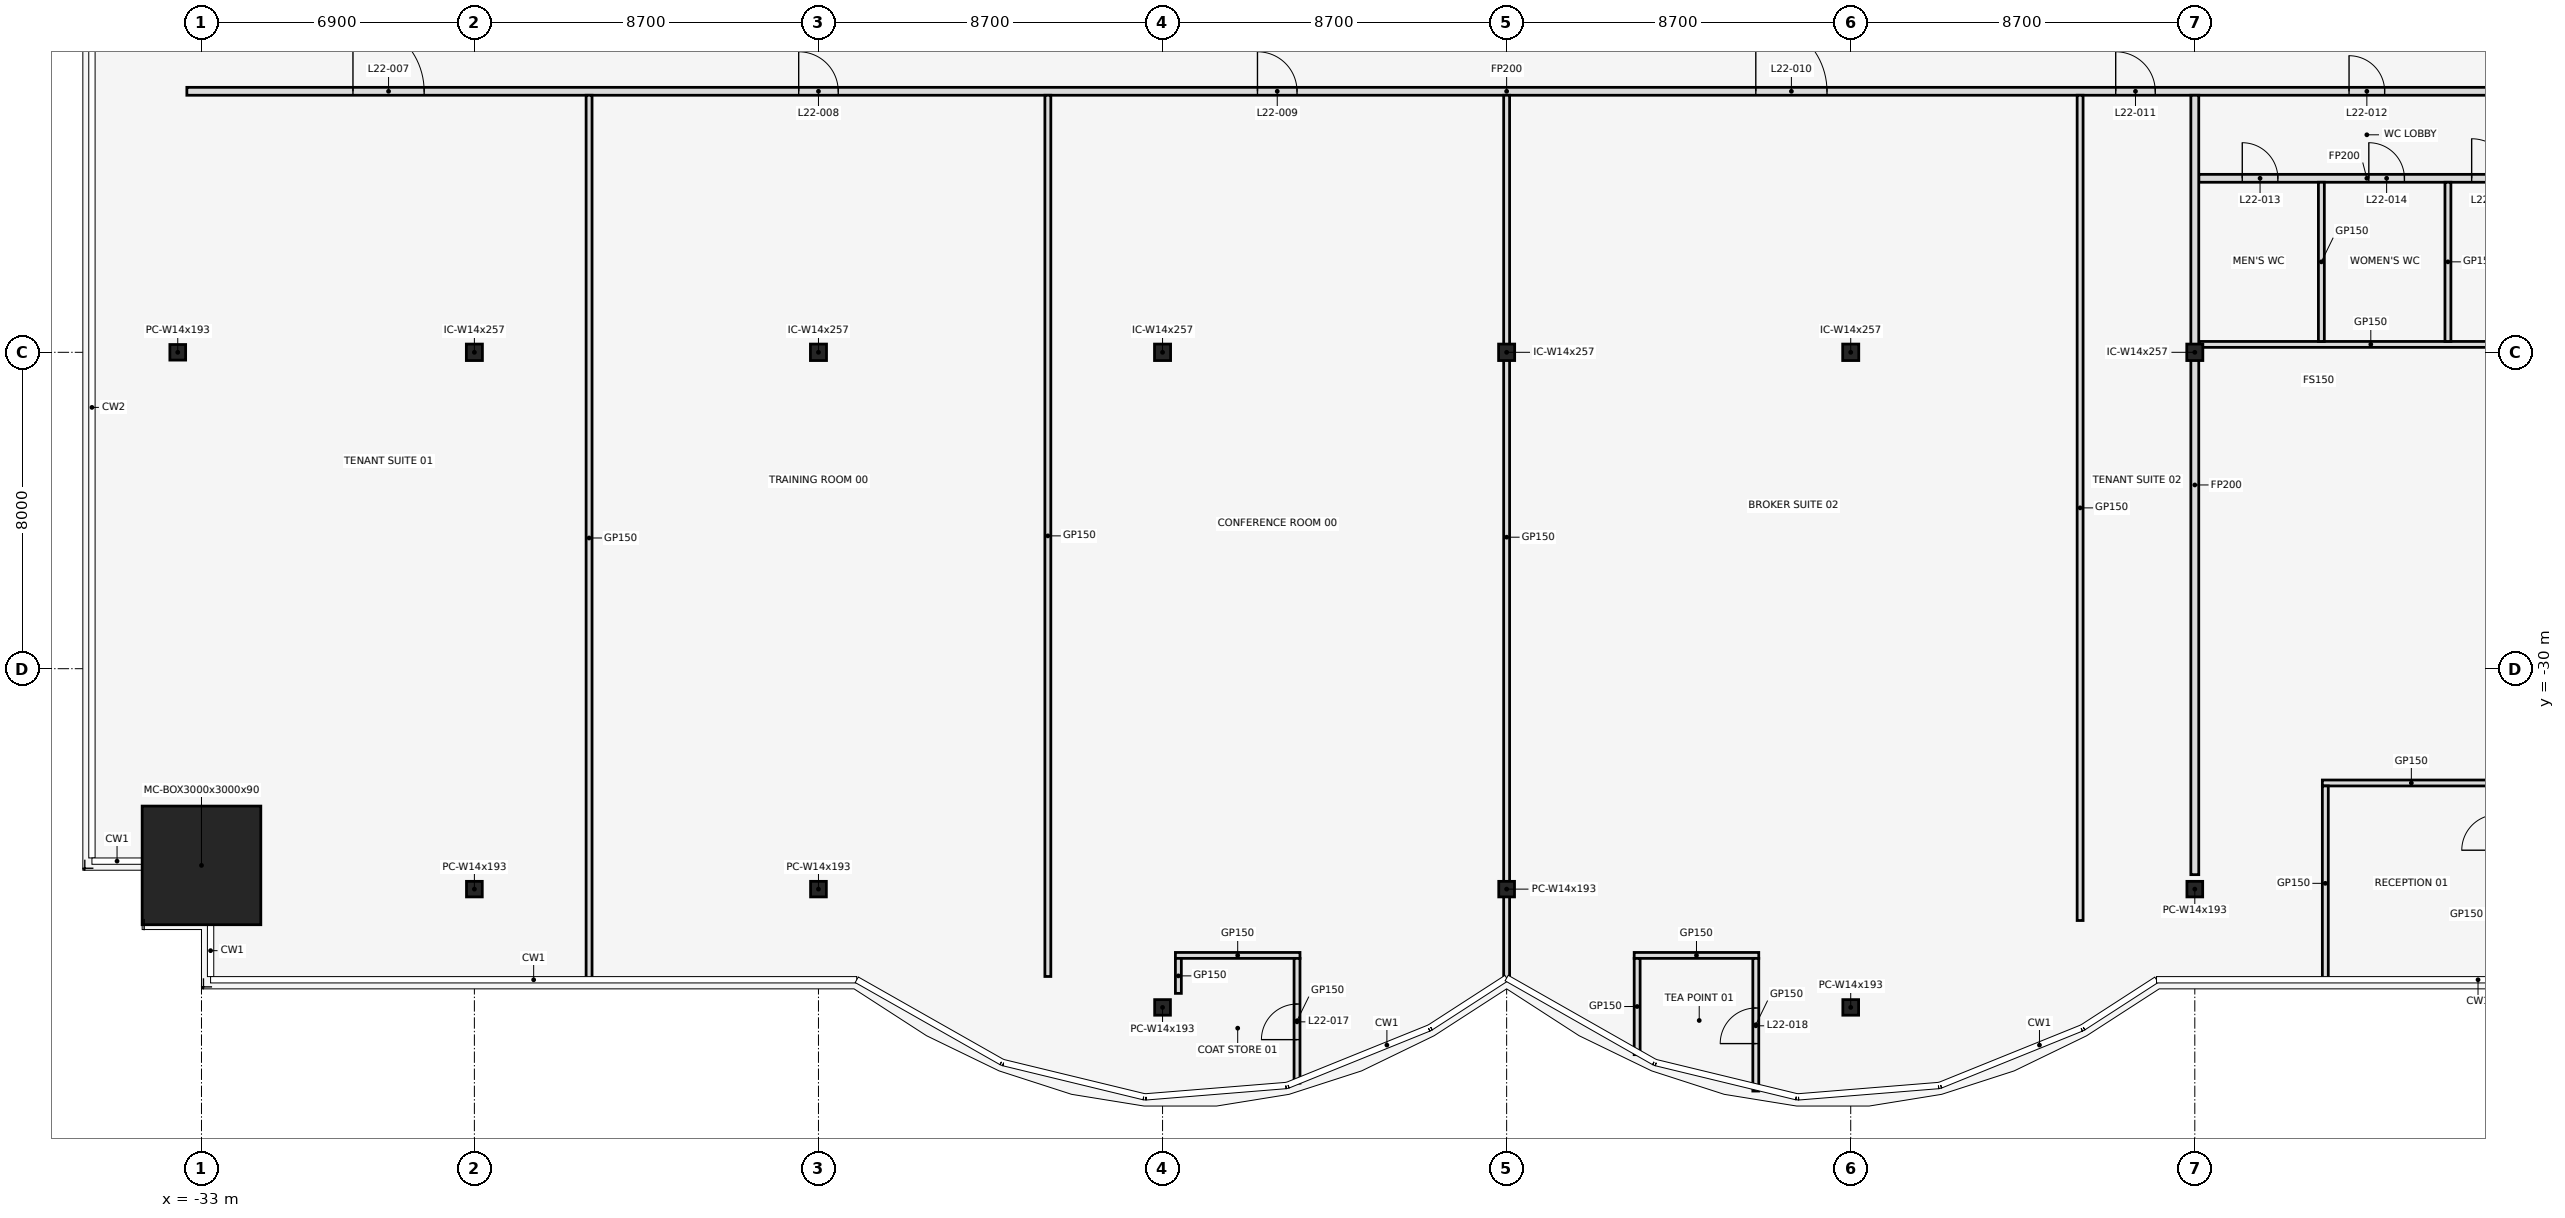
"""IFC4 building model, lengths in metres.
Left out: names, types, materials, properties, quantities, classifications, styles, units other than length and angle.
Written with IfcOpenShell. Run it as: python <this file> out.ifc"""

import sys

from ifc_helpers import new_model, si_unit, direction, frame, frame_2d, origin, origin_2d, place, context, subcontext, project, spatial, rectangle, hollow_rectangle, i_section, extrude, element, fill, save


model = new_model("IFC4")
c1 = context("Model", 3, precision=1e-05, world=origin(), true_north=direction((0.0, 1.0)))
c2 = subcontext(c1, "Body", "Model", "MODEL_VIEW")
j1 = project(units=[si_unit("LENGTHUNIT", "METRE"), si_unit("PLANEANGLEUNIT", "RADIAN")], contexts=[c1])
p1 = place(None, origin())
s1 = spatial("IfcSite", under=j1, at=p1, CompositionType="ELEMENT")
p2 = place(p1, origin())
s2 = spatial("IfcBuilding", under=s1, at=p2, CompositionType="ELEMENT")
p3 = place(p2, frame((0.0, 0.0, 106.3)))
s3 = spatial("IfcBuildingStorey", under=s2, at=p3, CompositionType="ELEMENT", Elevation=106.3)
p4 = place(p3, frame((-33.0, -34.974, 0.0), z_axis=(0.0, 0.0, 1.0), x_axis=(1.0, 0.0, 0.0)))
e1 = element("IfcColumn", 1, at=p4, inside=s3, PredefinedType="COLUMN", context=c2, shape_type="SweptSolid", body=[
    extrude(hollow_rectangle(XDim=3.0, YDim=3.0, WallThickness=0.09, at=origin_2d()), origin(), (0.0, 0.0, 1.0), 4.1),
])
for number, where, z_axis, x_axis in (
    (2, (-26.1, -35.574, 0.0), (0.0, 0.0, 1.0), (1.0, 0.0, 0.0)),
    (3, (-17.4, -35.574, 0.0), (0.0, 0.0, 1.0), (1.0, 0.0, 0.0)),
    (4, (-8.7, -38.565, 0.0), (0.0, 0.0, 1.0), (1.0, 0.0, 0.0)),
    (5, (0.0, -35.574, 0.0), (0.0, 0.0, 1.0), (1.0, 0.0, 0.0)),
    (6, (8.7, -38.565, 0.0), (0.0, 0.0, 1.0), (1.0, 0.0, 0.0)),
    (7, (17.4, -35.574, 0.0), (0.0, 0.0, 1.0), (1.0, 0.0, 0.0)),
    (8, (-33.6, -22.0, 0.0), (0.0, 0.0, 1.0), (1.0, 0.0, 0.0)),
):
    element("IfcColumn", number, at=place(p3, frame(where, z_axis=z_axis, x_axis=x_axis)), inside=s3, PredefinedType="COLUMN", context=c2, shape_type="SweptSolid", body=[
        extrude(i_section(OverallWidth=0.399, OverallDepth=0.394, WebThickness=0.023, FlangeThickness=0.037, at=origin_2d()), origin(), (0.0, 0.0, 1.0), 4.1),
    ])
for number, where, z_axis, x_axis in (
    (9, (-26.1, -22.0, 0.0), (0.0, 0.0, 1.0), (1.0, 0.0, 0.0)),
    (10, (-17.4, -22.0, 0.0), (0.0, 0.0, 1.0), (1.0, 0.0, 0.0)),
    (11, (-8.7, -22.0, 0.0), (0.0, 0.0, 1.0), (1.0, 0.0, 0.0)),
    (12, (0.0, -22.0, 0.0), (0.0, 0.0, 1.0), (1.0, 0.0, 0.0)),
    (13, (8.7, -22.0, 0.0), (0.0, 0.0, 1.0), (1.0, 0.0, 0.0)),
    (14, (17.4, -22.0, 0.0), (0.0, 0.0, 1.0), (1.0, 0.0, 0.0)),
):
    element("IfcColumn", number, at=place(p3, frame(where, z_axis=z_axis, x_axis=x_axis)), inside=s3, PredefinedType="COLUMN", context=c2, shape_type="SweptSolid", body=[
        extrude(i_section(OverallWidth=0.406, OverallDepth=0.417, WebThickness=0.03, FlangeThickness=0.048, at=origin_2d()), origin(), (0.0, 0.0, 1.0), 4.1),
    ])
for number, where, z_axis, x_axis in (
    (15, (-8.375, -37.25, 0.0), (0.0, 0.0, 1.0), (1.0, 0.0, 0.0)),
    (16, (3.225, -37.25, 0.0), (0.0, 0.0, 1.0), (1.0, 0.0, 0.0)),
):
    element("IfcWall", number, at=place(p3, frame(where, z_axis=z_axis, x_axis=x_axis)), inside=s3, PredefinedType="PARTITIONING", context=c2, shape_type="SweptSolid", body=[
        extrude(rectangle(XDim=3.15, YDim=0.15, at=frame_2d((1.575, 0.0))), origin(), (0.0, 0.0, 1.0), 3.018),
    ])
p5 = place(p3, frame((20.625, -32.89, 0.0), z_axis=(0.0, 0.0, 1.0), x_axis=(1.0, 0.0, 0.0)))
e17 = element("IfcWall", 17, at=p5, inside=s3, PredefinedType="PARTITIONING", context=c2, shape_type="SweptSolid", body=[
    extrude(rectangle(XDim=4.5, YDim=0.15, at=frame_2d((2.25, 0.0))), origin(), (0.0, 0.0, 1.0), 3.018),
])
p6 = place(p3, frame((17.5, -21.8, 0.0), z_axis=(0.0, 0.0, 1.0), x_axis=(1.0, 0.0, 0.0)))
e18 = element("IfcWall", 18, at=p6, inside=s3, PredefinedType="PARTITIONING", context=c2, shape_type="SweptSolid", body=[
    extrude(rectangle(XDim=8.7, YDim=0.15, at=frame_2d((4.35, 0.0))), origin(), (0.0, 0.0, 1.0), 3.018),
])
p7 = place(p3, frame((17.5, -17.6, 0.0), z_axis=(0.0, 0.0, 1.0), x_axis=(1.0, 0.0, 0.0)))
e19 = element("IfcWall", 19, at=p7, inside=s3, PredefinedType="PARTITIONING", context=c2, shape_type="SweptSolid", body=[
    extrude(rectangle(XDim=8.5, YDim=0.2, at=frame_2d((4.25, 0.0))), origin(), (0.0, 0.0, 1.0), 3.018),
])
p8 = place(p7, frame((1.1, 0.0, 0.0)))
e20 = element("IfcOpeningElement", 20, at=p8, cuts=e19, PredefinedType="OPENING", context=c2, shape_type="SweptSolid", body=[
    extrude(rectangle(XDim=0.9, YDim=2.1, at=frame_2d((0.45, 1.05))), frame((0.0, 0.112, 0.0), z_axis=(0.0, -1.0, 0.0), x_axis=(1.0, 0.0, 0.0)), (0.0, 0.0, 1.0), 0.224),
])
p9 = place(p7, frame((4.3, 0.0, 0.0)))
e21 = element("IfcOpeningElement", 21, at=p9, cuts=e19, PredefinedType="OPENING", context=c2, shape_type="SweptSolid", body=[
    extrude(rectangle(XDim=0.9, YDim=2.1, at=frame_2d((0.45, 1.05))), frame((0.0, 0.112, 0.0), z_axis=(0.0, -1.0, 0.0), x_axis=(1.0, 0.0, 0.0)), (0.0, 0.0, 1.0), 0.224),
])
p10 = place(p7, frame((6.9, 0.0, 0.0)))
e22 = element("IfcOpeningElement", 22, at=p10, cuts=e19, PredefinedType="OPENING", context=c2, shape_type="SweptSolid", body=[
    extrude(rectangle(XDim=1.0, YDim=2.1, at=frame_2d((0.5, 1.05))), frame((0.0, 0.112, 0.0), z_axis=(0.0, -1.0, 0.0), x_axis=(1.0, 0.0, 0.0)), (0.0, 0.0, 1.0), 0.224),
])
p11 = place(p3, frame((-33.37, -15.4, 0.0), z_axis=(0.0, 0.0, 1.0), x_axis=(1.0, 0.0, 0.0)))
e23 = element("IfcWall", 23, at=p11, inside=s3, PredefinedType="PARTITIONING", context=c2, shape_type="SweptSolid", body=[
    extrude(rectangle(XDim=66.74, YDim=0.2, at=frame_2d((33.37, 0.0))), origin(), (0.0, 0.0, 1.0), 3.018),
])
p12 = place(p11, frame((4.2, 0.0, 0.0)))
e24 = element("IfcOpeningElement", 24, at=p12, cuts=e23, PredefinedType="OPENING", context=c2, shape_type="SweptSolid", body=[
    extrude(rectangle(XDim=1.8, YDim=2.1, at=frame_2d((0.9, 1.05))), frame((0.0, 0.112, 0.0), z_axis=(0.0, -1.0, 0.0), x_axis=(1.0, 0.0, 0.0)), (0.0, 0.0, 1.0), 0.224),
])
p13 = place(p11, frame((15.47, 0.0, 0.0)))
e25 = element("IfcOpeningElement", 25, at=p13, cuts=e23, PredefinedType="OPENING", context=c2, shape_type="SweptSolid", body=[
    extrude(rectangle(XDim=1.0, YDim=2.1, at=frame_2d((0.5, 1.05))), frame((0.0, 0.112, 0.0), z_axis=(0.0, -1.0, 0.0), x_axis=(1.0, 0.0, 0.0)), (0.0, 0.0, 1.0), 0.224),
])
p14 = place(p11, frame((27.07, 0.0, 0.0)))
e26 = element("IfcOpeningElement", 26, at=p14, cuts=e23, PredefinedType="OPENING", context=c2, shape_type="SweptSolid", body=[
    extrude(rectangle(XDim=1.0, YDim=2.1, at=frame_2d((0.5, 1.05))), frame((0.0, 0.112, 0.0), z_axis=(0.0, -1.0, 0.0), x_axis=(1.0, 0.0, 0.0)), (0.0, 0.0, 1.0), 0.224),
])
p15 = place(p11, frame((39.67, 0.0, 0.0)))
e27 = element("IfcOpeningElement", 27, at=p15, cuts=e23, PredefinedType="OPENING", context=c2, shape_type="SweptSolid", body=[
    extrude(rectangle(XDim=1.8, YDim=2.1, at=frame_2d((0.9, 1.05))), frame((0.0, 0.112, 0.0), z_axis=(0.0, -1.0, 0.0), x_axis=(1.0, 0.0, 0.0)), (0.0, 0.0, 1.0), 0.224),
])
p16 = place(p11, frame((48.77, 0.0, 0.0)))
e28 = element("IfcOpeningElement", 28, at=p16, cuts=e23, PredefinedType="OPENING", context=c2, shape_type="SweptSolid", body=[
    extrude(rectangle(XDim=1.0, YDim=2.1, at=frame_2d((0.5, 1.05))), frame((0.0, 0.112, 0.0), z_axis=(0.0, -1.0, 0.0), x_axis=(1.0, 0.0, 0.0)), (0.0, 0.0, 1.0), 0.224),
])
p17 = place(p11, frame((54.67, 0.0, 0.0)))
e29 = element("IfcOpeningElement", 29, at=p17, cuts=e23, PredefinedType="OPENING", context=c2, shape_type="SweptSolid", body=[
    extrude(rectangle(XDim=0.9, YDim=2.1, at=frame_2d((0.45, 1.05))), frame((0.0, 0.112, 0.0), z_axis=(0.0, -1.0, 0.0), x_axis=(1.0, 0.0, 0.0)), (0.0, 0.0, 1.0), 0.224),
])
p18 = place(p11, frame((62.57, 0.0, 0.0)))
e30 = element("IfcOpeningElement", 30, at=p18, cuts=e23, PredefinedType="OPENING", context=c2, shape_type="SweptSolid", body=[
    extrude(rectangle(XDim=1.0, YDim=2.1, at=frame_2d((0.5, 1.05))), frame((0.0, 0.112, 0.0), z_axis=(0.0, -1.0, 0.0), x_axis=(1.0, 0.0, 0.0)), (0.0, 0.0, 1.0), 0.224),
])
p19 = place(p3, frame((-23.2, -37.89, 0.0), z_axis=(0.0, 0.0, 1.0), x_axis=(0.0, 1.0, 0.0)))
e31 = element("IfcWall", 31, at=p19, inside=s3, PredefinedType="PARTITIONING", context=c2, shape_type="SweptSolid", body=[
    extrude(rectangle(XDim=22.39, YDim=0.15, at=frame_2d((11.195, 0.0))), origin(), (0.0, 0.0, 1.0), 3.018),
])
p20 = place(p3, frame((-11.6, -37.783, 0.0), z_axis=(0.0, 0.0, 1.0), x_axis=(0.0, 1.0, 0.0)))
e32 = element("IfcWall", 32, at=p20, inside=s3, PredefinedType="PARTITIONING", context=c2, shape_type="SweptSolid", body=[
    extrude(rectangle(XDim=22.283, YDim=0.15, at=frame_2d((11.142, 0.0))), origin(), (0.0, 0.0, 1.0), 3.018),
])
p21 = place(p3, frame((-8.3, -38.21, 0.0), z_axis=(0.0, 0.0, 1.0), x_axis=(0.0, 1.0, 0.0)))
e33 = element("IfcWall", 33, at=p21, inside=s3, PredefinedType="PARTITIONING", context=c2, shape_type="SweptSolid", body=[
    extrude(rectangle(XDim=0.885, YDim=0.15, at=frame_2d((0.442, 0.0))), origin(), (0.0, 0.0, 1.0), 3.018),
])
p22 = place(p3, frame((-5.3, -40.48, 0.0), z_axis=(0.0, 0.0, 1.0), x_axis=(0.0, 1.0, 0.0)))
e34 = element("IfcWall", 34, at=p22, inside=s3, PredefinedType="PARTITIONING", context=c2, shape_type="SweptSolid", body=[
    extrude(rectangle(XDim=3.155, YDim=0.15, at=frame_2d((1.578, 0.0))), origin(), (0.0, 0.0, 1.0), 3.018),
])
p23 = place(p22, frame((1.1, 0.0, 0.0)))
e35 = element("IfcOpeningElement", 35, at=p23, cuts=e34, PredefinedType="OPENING", context=c2, shape_type="SweptSolid", body=[
    extrude(rectangle(XDim=0.9, YDim=2.1, at=frame_2d((0.45, 1.05))), frame((0.0, 0.087, 0.0), z_axis=(0.0, -1.0, 0.0), x_axis=(1.0, 0.0, 0.0)), (0.0, 0.0, 1.0), 0.174),
])
p24 = place(p3, frame((0.0, -37.85, 0.0), z_axis=(0.0, 0.0, 1.0), x_axis=(0.0, 1.0, 0.0)))
e36 = element("IfcWall", 36, at=p24, inside=s3, PredefinedType="PARTITIONING", context=c2, shape_type="SweptSolid", body=[
    extrude(rectangle(XDim=22.35, YDim=0.15, at=frame_2d((11.175, 0.0))), origin(), (0.0, 0.0, 1.0), 3.018),
])
p25 = place(p3, frame((3.3, -39.76, 0.0), z_axis=(0.0, 0.0, 1.0), x_axis=(0.0, 1.0, 0.0)))
e37 = element("IfcWall", 37, at=p25, inside=s3, PredefinedType="PARTITIONING", context=c2, shape_type="SweptSolid", body=[
    extrude(rectangle(XDim=2.435, YDim=0.15, at=frame_2d((1.218, 0.0))), origin(), (0.0, 0.0, 1.0), 3.018),
])
p26 = place(p3, frame((6.3, -40.68, 0.0), z_axis=(0.0, 0.0, 1.0), x_axis=(0.0, 1.0, 0.0)))
e38 = element("IfcWall", 38, at=p26, inside=s3, PredefinedType="PARTITIONING", context=c2, shape_type="SweptSolid", body=[
    extrude(rectangle(XDim=3.355, YDim=0.15, at=frame_2d((1.677, 0.0))), origin(), (0.0, 0.0, 1.0), 3.018),
])
p27 = place(p26, frame((1.2, 0.0, 0.0)))
e39 = element("IfcOpeningElement", 39, at=p27, cuts=e38, PredefinedType="OPENING", context=c2, shape_type="SweptSolid", body=[
    extrude(rectangle(XDim=0.9, YDim=2.1, at=frame_2d((0.45, 1.05))), frame((0.0, 0.087, 0.0), z_axis=(0.0, -1.0, 0.0), x_axis=(1.0, 0.0, 0.0)), (0.0, 0.0, 1.0), 0.174),
])
p28 = place(p3, frame((14.5, -36.368, 0.0), z_axis=(0.0, 0.0, 1.0), x_axis=(0.0, 1.0, 0.0)))
e40 = element("IfcWall", 40, at=p28, inside=s3, PredefinedType="PARTITIONING", context=c2, shape_type="SweptSolid", body=[
    extrude(rectangle(XDim=20.868, YDim=0.15, at=frame_2d((10.434, 0.0))), origin(), (0.0, 0.0, 1.0), 3.018),
])
p29 = place(p3, frame((17.4, -35.208, 0.0), z_axis=(0.0, 0.0, 1.0), x_axis=(0.0, 1.0, 0.0)))
e41 = element("IfcWall", 41, at=p29, inside=s3, PredefinedType="PARTITIONING", context=c2, shape_type="SweptSolid", body=[
    extrude(rectangle(XDim=19.708, YDim=0.2, at=frame_2d((9.854, 0.0))), origin(), (0.0, 0.0, 1.0), 3.018),
])
p30 = place(p3, frame((20.6, -21.725, 0.0), z_axis=(0.0, 0.0, 1.0), x_axis=(0.0, 1.0, 0.0)))
e42 = element("IfcWall", 42, at=p30, inside=s3, PredefinedType="PARTITIONING", context=c2, shape_type="SweptSolid", body=[
    extrude(rectangle(XDim=4.025, YDim=0.15, at=frame_2d((2.013, 0.0))), origin(), (0.0, 0.0, 1.0), 3.018),
])
p31 = place(p3, frame((20.7, -37.89, 0.0), z_axis=(0.0, 0.0, 1.0), x_axis=(0.0, 1.0, 0.0)))
e43 = element("IfcWall", 43, at=p31, inside=s3, PredefinedType="PARTITIONING", context=c2, shape_type="SweptSolid", body=[
    extrude(rectangle(XDim=4.925, YDim=0.15, at=frame_2d((2.462, 0.0))), origin(), (0.0, 0.0, 1.0), 3.018),
])
p32 = place(p3, frame((23.8, -21.725, 0.0), z_axis=(0.0, 0.0, 1.0), x_axis=(0.0, 1.0, 0.0)))
e44 = element("IfcWall", 44, at=p32, inside=s3, PredefinedType="PARTITIONING", context=c2, shape_type="SweptSolid", body=[
    extrude(rectangle(XDim=4.025, YDim=0.15, at=frame_2d((2.013, 0.0))), origin(), (0.0, 0.0, 1.0), 3.018),
])
p33 = place(p12, origin())
e45 = element("IfcDoor", 45, at=p33, inside=s3, OperationType="SINGLE_SWING_LEFT", PredefinedType="DOOR", context=c2, shape_type="SweptSolid", body=[
    extrude(rectangle(XDim=1.8, YDim=2.1, at=frame_2d((0.9, 1.05))), frame((0.0, 0.025, 0.0), z_axis=(0.0, -1.0, 0.0), x_axis=(1.0, 0.0, 0.0)), (0.0, 0.0, 1.0), 0.05),
])
fill(e24, e45)
p34 = place(p13, frame((1.0, 0.0, 0.0), z_axis=(0.0, 0.0, 1.0), x_axis=(-1.0, 0.0, 0.0)))
e46 = element("IfcDoor", 46, at=p34, inside=s3, OperationType="SINGLE_SWING_RIGHT", PredefinedType="DOOR", context=c2, shape_type="SweptSolid", body=[
    extrude(rectangle(XDim=1.0, YDim=2.1, at=frame_2d((0.5, 1.05))), frame((0.0, 0.025, 0.0), z_axis=(0.0, -1.0, 0.0), x_axis=(1.0, 0.0, 0.0)), (0.0, 0.0, 1.0), 0.05),
])
fill(e25, e46)
p35 = place(p14, frame((1.0, 0.0, 0.0), z_axis=(0.0, 0.0, 1.0), x_axis=(-1.0, 0.0, 0.0)))
e47 = element("IfcDoor", 47, at=p35, inside=s3, OperationType="SINGLE_SWING_RIGHT", PredefinedType="DOOR", context=c2, shape_type="SweptSolid", body=[
    extrude(rectangle(XDim=1.0, YDim=2.1, at=frame_2d((0.5, 1.05))), frame((0.0, 0.025, 0.0), z_axis=(0.0, -1.0, 0.0), x_axis=(1.0, 0.0, 0.0)), (0.0, 0.0, 1.0), 0.05),
])
fill(e26, e47)
p36 = place(p15, origin())
e48 = element("IfcDoor", 48, at=p36, inside=s3, OperationType="SINGLE_SWING_LEFT", PredefinedType="DOOR", context=c2, shape_type="SweptSolid", body=[
    extrude(rectangle(XDim=1.8, YDim=2.1, at=frame_2d((0.9, 1.05))), frame((0.0, 0.025, 0.0), z_axis=(0.0, -1.0, 0.0), x_axis=(1.0, 0.0, 0.0)), (0.0, 0.0, 1.0), 0.05),
])
fill(e27, e48)
p37 = place(p16, frame((1.0, 0.0, 0.0), z_axis=(0.0, 0.0, 1.0), x_axis=(-1.0, 0.0, 0.0)))
e49 = element("IfcDoor", 49, at=p37, inside=s3, OperationType="SINGLE_SWING_RIGHT", PredefinedType="DOOR", context=c2, shape_type="SweptSolid", body=[
    extrude(rectangle(XDim=1.0, YDim=2.1, at=frame_2d((0.5, 1.05))), frame((0.0, 0.025, 0.0), z_axis=(0.0, -1.0, 0.0), x_axis=(1.0, 0.0, 0.0)), (0.0, 0.0, 1.0), 0.05),
])
fill(e28, e49)
p38 = place(p17, frame((0.9, 0.0, 0.0), z_axis=(0.0, 0.0, 1.0), x_axis=(-1.0, 0.0, 0.0)))
e50 = element("IfcDoor", 50, at=p38, inside=s3, OperationType="SINGLE_SWING_RIGHT", PredefinedType="DOOR", context=c2, shape_type="SweptSolid", body=[
    extrude(rectangle(XDim=0.9, YDim=2.1, at=frame_2d((0.45, 1.05))), frame((0.0, 0.025, 0.0), z_axis=(0.0, -1.0, 0.0), x_axis=(1.0, 0.0, 0.0)), (0.0, 0.0, 1.0), 0.05),
])
fill(e29, e50)
p39 = place(p8, frame((0.9, 0.0, 0.0), z_axis=(0.0, 0.0, 1.0), x_axis=(-1.0, 0.0, 0.0)))
e51 = element("IfcDoor", 51, at=p39, inside=s3, OperationType="SINGLE_SWING_LEFT", PredefinedType="DOOR", context=c2, shape_type="SweptSolid", body=[
    extrude(rectangle(XDim=0.9, YDim=2.1, at=frame_2d((0.45, 1.05))), frame((0.0, 0.025, 0.0), z_axis=(0.0, -1.0, 0.0), x_axis=(1.0, 0.0, 0.0)), (0.0, 0.0, 1.0), 0.05),
])
fill(e20, e51)
p40 = place(p9, frame((0.9, 0.0, 0.0), z_axis=(0.0, 0.0, 1.0), x_axis=(-1.0, 0.0, 0.0)))
e52 = element("IfcDoor", 52, at=p40, inside=s3, OperationType="SINGLE_SWING_RIGHT", PredefinedType="DOOR", context=c2, shape_type="SweptSolid", body=[
    extrude(rectangle(XDim=0.9, YDim=2.1, at=frame_2d((0.45, 1.05))), frame((0.0, 0.025, 0.0), z_axis=(0.0, -1.0, 0.0), x_axis=(1.0, 0.0, 0.0)), (0.0, 0.0, 1.0), 0.05),
])
fill(e21, e52)
p41 = place(p10, frame((1.0, 0.0, 0.0), z_axis=(0.0, 0.0, 1.0), x_axis=(-1.0, 0.0, 0.0)))
e53 = element("IfcDoor", 53, at=p41, inside=s3, OperationType="SINGLE_SWING_RIGHT", PredefinedType="DOOR", context=c2, shape_type="SweptSolid", body=[
    extrude(rectangle(XDim=1.0, YDim=2.1, at=frame_2d((0.5, 1.05))), frame((0.0, 0.025, 0.0), z_axis=(0.0, -1.0, 0.0), x_axis=(1.0, 0.0, 0.0)), (0.0, 0.0, 1.0), 0.05),
])
fill(e22, e53)
p42 = place(p23, origin())
e54 = element("IfcDoor", 54, at=p42, inside=s3, OperationType="SINGLE_SWING_LEFT", PredefinedType="DOOR", context=c2, shape_type="SweptSolid", body=[
    extrude(rectangle(XDim=0.9, YDim=2.1, at=frame_2d((0.45, 1.05))), frame((0.0, 0.025, 0.0), z_axis=(0.0, -1.0, 0.0), x_axis=(1.0, 0.0, 0.0)), (0.0, 0.0, 1.0), 0.05),
])
fill(e35, e54)
p43 = place(p27, origin())
e55 = element("IfcDoor", 55, at=p43, inside=s3, OperationType="SINGLE_SWING_RIGHT", PredefinedType="DOOR", context=c2, shape_type="SweptSolid", body=[
    extrude(rectangle(XDim=0.9, YDim=2.1, at=frame_2d((0.45, 1.05))), frame((0.0, 0.025, 0.0), z_axis=(0.0, -1.0, 0.0), x_axis=(1.0, 0.0, 0.0)), (0.0, 0.0, 1.0), 0.05),
])
fill(e39, e55)
save(model, sys.argv[1])
